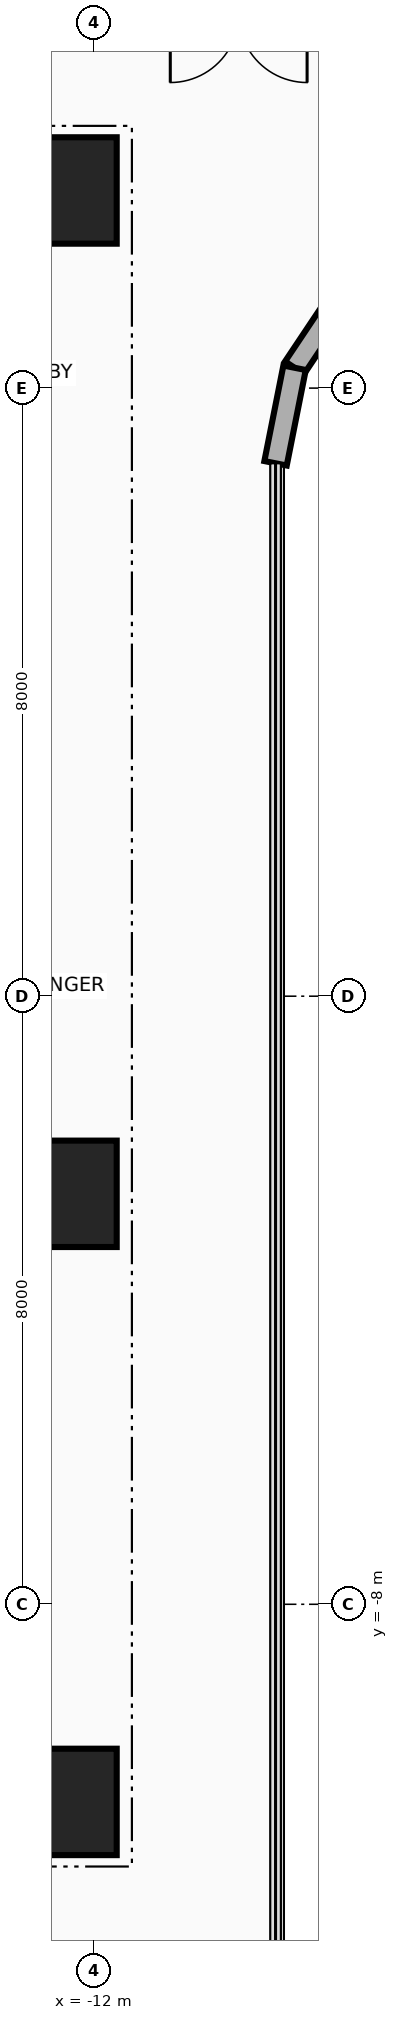
"""IFC4 building model, lengths in metres.
Left out: names, types, materials, properties, quantities, classifications, styles, units other than length and angle.
Written with IfcOpenShell. Run it as: python <this file> out.ifc"""

import sys

from ifc_helpers import new_model, si_unit, direction, frame, frame_2d, origin, origin_2d, place, context, subcontext, project, spatial, rectangle, extrude, source, transform, mapped, element, save


model = new_model("IFC4")
c1 = context("Model", 3, precision=1e-05, world=origin(), true_north=direction((0.0, 1.0)))
c2 = subcontext(c1, "Body", "Model", "MODEL_VIEW")
j1 = project(units=[si_unit("LENGTHUNIT", "METRE"), si_unit("PLANEANGLEUNIT", "RADIAN")], contexts=[c1])
p1 = place(None, origin())
s1 = spatial("IfcSite", under=j1, at=p1, CompositionType="ELEMENT")
p2 = place(p1, origin())
s2 = spatial("IfcBuilding", under=s1, at=p2, CompositionType="ELEMENT")
p3 = place(p2, frame((0.0, 0.0, 63.0)))
s3 = spatial("IfcBuildingStorey", under=s2, at=p3, CompositionType="ELEMENT", Elevation=63.0)
for number, where, z_axis, x_axis in (
    (1, (-22.65, 10.8, 0.0), (0.0, 0.0, 1.0), (1.0, 0.0, 0.0)),
    (2, (-22.65, -10.8, 0.0), (0.0, 0.0, 1.0), (1.0, 0.0, 0.0)),
):
    element("IfcWall", number, at=place(p3, frame(where, z_axis=z_axis, x_axis=x_axis)), inside=s3, PredefinedType="SHEAR", context=c2, shape_type="SweptSolid", body=[
        extrude(rectangle(XDim=10.25, YDim=0.7, at=frame_2d((5.125, 0.0))), origin(), (0.0, 0.0, 1.0), 3.46),
    ])
m1 = source(origin(), c2, "Body", "SweptSolid", [
    extrude(rectangle(XDim=1.4, YDim=1.4, at=origin_2d()), origin(), (0.0, 0.0, 1.0), 3.7),
])
for number, where, z_axis, x_axis in (
    (3, (-12.4, -10.6, 0.0), (0.0, 0.0, 1.0), (1.0, 0.0, 0.0)),
    (4, (-12.4, -2.6, 0.0), (0.0, 0.0, 1.0), (1.0, 0.0, 0.0)),
    (5, (-12.4, 10.6, 0.0), (0.0, 0.0, 1.0), (1.0, 0.0, 0.0)),
):
    element("IfcColumn", number, at=place(p3, frame(where, z_axis=z_axis, x_axis=x_axis)), inside=s3, PredefinedType="COLUMN", context=c2, shape_type="MappedRepresentation", body=[
        mapped(m1, transform((0.0, 0.0, 0.0), x_axis=(1.0, 0.0, 0.0), y_axis=(0.0, 1.0, 0.0), z_axis=(0.0, 0.0, 1.0), scale=1.0)),
    ])
p4 = place(p3, frame((-8.642, 9.342, 0.0), z_axis=(0.0, 0.0, 1.0), x_axis=(-0.555615398575, -0.831439431869, 0.0)))
e6 = element("IfcWall", 6, at=p4, inside=s3, PredefinedType="SOLIDWALL", context=c2, shape_type="SweptSolid", body=[
    extrude(rectangle(XDim=1.292, YDim=0.3, at=frame_2d((0.646, 0.0))), origin(), (0.0, 0.0, 1.0), 3.46),
])
p5 = place(p3, frame((-9.36, 8.268, 0.0), z_axis=(0.0, 0.0, 1.0), x_axis=(-0.195090163074, -0.980785312019, 0.0)))
e7 = element("IfcWall", 7, at=p5, inside=s3, PredefinedType="SOLIDWALL", context=c2, shape_type="SweptSolid", body=[
    extrude(rectangle(XDim=1.281, YDim=0.3, at=frame_2d((0.641, 0.0))), origin(), (0.0, 0.0, 1.0), 3.46),
])
save(model, sys.argv[1])
